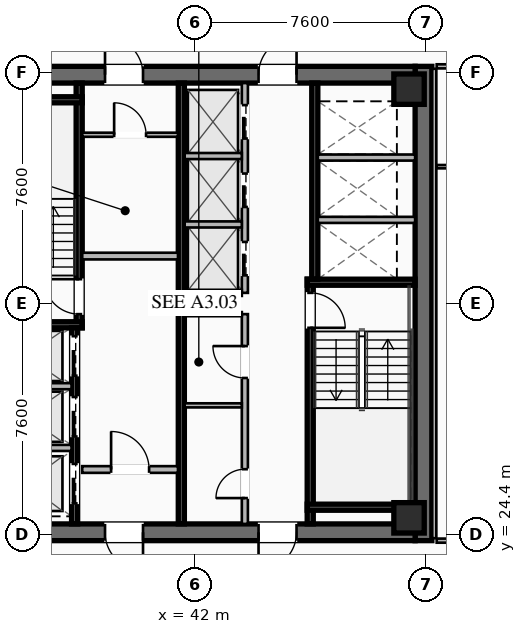
"""IFC4 building model, lengths in metres.
Left out: names, types, materials, properties, quantities, classifications, styles, units other than length and angle.
Written with IfcOpenShell. Run it as: python <this file> out.ifc"""

import sys

from ifc_helpers import new_model, si_unit, direction, frame, frame_2d, origin, origin_2d, place, context, subcontext, project, spatial, rectangle, hollow_rectangle, extrude, element, fill, save


model = new_model("IFC4")
c1 = context("Model", 3, precision=1e-05, world=origin(), true_north=direction((0.0, 1.0)))
c2 = subcontext(c1, "Body", "Model", "MODEL_VIEW")
j1 = project(units=[si_unit("LENGTHUNIT", "METRE"), si_unit("PLANEANGLEUNIT", "RADIAN")], contexts=[c1])
p1 = place(None, origin())
s1 = spatial("IfcSite", under=j1, at=p1, CompositionType="ELEMENT")
p2 = place(p1, origin())
s2 = spatial("IfcBuilding", under=s1, at=p2, CompositionType="ELEMENT")
p3 = place(p2, frame((0.0, 0.0, 164.1)))
s3 = spatial("IfcBuildingStorey", under=s2, at=p3, CompositionType="ELEMENT", Elevation=164.1)
p4 = place(p3, frame((49.525, 39.8, 0.0), z_axis=(0.0, 0.0, 1.0), x_axis=(0.0, -1.0, 0.0)))
e1 = element("IfcWall", 1, at=p4, inside=s3, PredefinedType="SHEAR", context=c2, shape_type="SweptSolid", body=[
    extrude(rectangle(XDim=15.6, YDim=0.55, at=frame_2d((7.8, 0.0))), origin(), (0.0, 0.0, 1.0), 3.55),
])
p5 = place(p3, frame((49.25, 24.475, 0.0), z_axis=(0.0, 0.0, 1.0), x_axis=(-1.0, 0.0, 0.0)))
e2 = element("IfcWall", 2, at=p5, inside=s3, PredefinedType="SHEAR", context=c2, shape_type="SweptSolid", body=[
    extrude(rectangle(XDim=14.5, YDim=0.55, at=frame_2d((7.25, 0.0))), origin(), (0.0, 0.0, 1.0), 3.55),
])
p6 = place(p5, frame((8.95, 0.0, 0.0)))
e3 = element("IfcOpeningElement", 3, at=p6, cuts=e2, PredefinedType="OPENING", context=c2, shape_type="SweptSolid", body=[
    extrude(rectangle(XDim=1.25, YDim=2.25, at=frame_2d((0.625, 1.125))), frame((0.0, 0.285, 0.0), z_axis=(0.0, -1.0, 0.0), x_axis=(1.0, 0.0, 0.0)), (0.0, 0.0, 1.0), 0.57),
])
p7 = place(p5, frame((3.9, 0.0, 0.0)))
e4 = element("IfcOpeningElement", 4, at=p7, cuts=e2, PredefinedType="OPENING", context=c2, shape_type="SweptSolid", body=[
    extrude(rectangle(XDim=1.25, YDim=2.25, at=frame_2d((0.625, 1.125))), frame((0.0, 0.285, 0.0), z_axis=(0.0, -1.0, 0.0), x_axis=(1.0, 0.0, 0.0)), (0.0, 0.0, 1.0), 0.57),
])
p8 = place(p3, frame((34.75, 39.525, 0.0), z_axis=(0.0, 0.0, 1.0), x_axis=(1.0, 0.0, 0.0)))
e5 = element("IfcWall", 5, at=p8, inside=s3, PredefinedType="SHEAR", context=c2, shape_type="SweptSolid", body=[
    extrude(rectangle(XDim=14.5, YDim=0.55, at=frame_2d((7.25, 0.0))), origin(), (0.0, 0.0, 1.0), 3.55),
])
p9 = place(p8, frame((4.3, 0.0, 0.0)))
e6 = element("IfcOpeningElement", 6, at=p9, cuts=e5, PredefinedType="OPENING", context=c2, shape_type="SweptSolid", body=[
    extrude(rectangle(XDim=1.25, YDim=2.25, at=frame_2d((0.625, 1.125))), frame((0.0, 0.285, 0.0), z_axis=(0.0, -1.0, 0.0), x_axis=(1.0, 0.0, 0.0)), (0.0, 0.0, 1.0), 0.57),
])
p10 = place(p8, frame((9.35, 0.0, 0.0)))
e7 = element("IfcOpeningElement", 7, at=p10, cuts=e5, PredefinedType="OPENING", context=c2, shape_type="SweptSolid", body=[
    extrude(rectangle(XDim=1.25, YDim=2.25, at=frame_2d((0.625, 1.125))), frame((0.0, 0.285, 0.0), z_axis=(0.0, -1.0, 0.0), x_axis=(1.0, 0.0, 0.0)), (0.0, 0.0, 1.0), 0.57),
])
for number, where, z_axis, x_axis in (
    (8, (49.05, 24.95, 0.0), (0.0, 0.0, 1.0), (1.0, 0.0, 0.0)),
    (9, (49.05, 39.05, 0.0), (0.0, 0.0, 1.0), (1.0, 0.0, 0.0)),
):
    element("IfcColumn", number, at=place(p3, frame(where, z_axis=z_axis, x_axis=x_axis)), inside=s3, PredefinedType="COLUMN", context=c2, shape_type="SweptSolid", body=[
        extrude(hollow_rectangle(XDim=1.0, YDim=1.0, WallThickness=0.04, at=origin_2d()), origin(), (0.0, 0.0, 1.0), 3.37),
    ])
p11 = place(p3, frame((38.2, 31.2, 0.0), z_axis=(0.0, 0.0, 1.0), x_axis=(0.0, 1.0, 0.0)))
e10 = element("IfcWall", 10, at=p11, inside=s3, PredefinedType="SHEAR", context=c2, shape_type="SweptSolid", body=[
    extrude(rectangle(XDim=8.05, YDim=0.2, at=frame_2d((4.025, 0.0))), origin(), (0.0, 0.0, 1.0), 3.37),
])
p12 = place(p11, frame((0.45, 0.0, 0.0)))
e11 = element("IfcOpeningElement", 11, at=p12, cuts=e10, PredefinedType="OPENING", context=c2, shape_type="SweptSolid", body=[
    extrude(rectangle(XDim=1.15, YDim=2.2, at=frame_2d((0.575, 1.1))), frame((0.0, 0.11, 0.0), z_axis=(0.0, -1.0, 0.0), x_axis=(1.0, 0.0, 0.0)), (0.0, 0.0, 1.0), 0.22),
])
for number, where, z_axis, x_axis in (
    (12, (34.75, 31.3, 0.0), (0.0, 0.0, 1.0), (1.0, 0.0, 0.0)),
    (13, (34.75, 38.7, 0.0), (0.0, 0.0, 1.0), (1.0, 0.0, 0.0)),
):
    element("IfcWall", number, at=place(p3, frame(where, z_axis=z_axis, x_axis=x_axis)), inside=s3, PredefinedType="SHEAR", context=c2, shape_type="SweptSolid", body=[
        extrude(rectangle(XDim=3.55, YDim=0.2, at=frame_2d((1.775, 0.0))), origin(), (0.0, 0.0, 1.0), 3.37),
    ])
p13 = place(p3, frame((45.8, 32.8, 0.0), z_axis=(0.0, 0.0, 1.0), x_axis=(0.0, -1.0, 0.0)))
e14 = element("IfcWall", 14, at=p13, inside=s3, PredefinedType="SHEAR", context=c2, shape_type="SweptSolid", body=[
    extrude(rectangle(XDim=8.05, YDim=0.2, at=frame_2d((4.025, 0.0))), origin(), (0.0, 0.0, 1.0), 3.37),
])
p14 = place(p13, frame((0.45, 0.0, 0.0)))
e15 = element("IfcOpeningElement", 15, at=p14, cuts=e14, PredefinedType="OPENING", context=c2, shape_type="SweptSolid", body=[
    extrude(rectangle(XDim=1.15, YDim=2.2, at=frame_2d((0.575, 1.1))), frame((0.0, 0.11, 0.0), z_axis=(0.0, -1.0, 0.0), x_axis=(1.0, 0.0, 0.0)), (0.0, 0.0, 1.0), 0.22),
])
for number, where, z_axis, x_axis in (
    (16, (45.7, 32.7, 0.0), (0.0, 0.0, 1.0), (1.0, 0.0, 0.0)),
    (17, (45.7, 25.3, 0.0), (0.0, 0.0, 1.0), (1.0, 0.0, 0.0)),
):
    element("IfcWall", number, at=place(p3, frame(where, z_axis=z_axis, x_axis=x_axis)), inside=s3, PredefinedType="SHEAR", context=c2, shape_type="SweptSolid", body=[
        extrude(rectangle(XDim=3.55, YDim=0.2, at=frame_2d((1.775, 0.0))), origin(), (0.0, 0.0, 1.0), 3.37),
    ])
p15 = place(p3, frame((41.56, 24.75, 0.0), z_axis=(0.0, 0.0, 1.0), x_axis=(0.0, 1.0, 0.0)))
e18 = element("IfcWall", 18, at=p15, inside=s3, PredefinedType="SHEAR", context=c2, shape_type="SweptSolid", body=[
    extrude(rectangle(XDim=14.5, YDim=0.2, at=frame_2d((7.25, 0.0))), origin(), (0.0, 0.0, 1.0), 3.37),
])
p16 = place(p3, frame((38.3, 33.56, 0.0), z_axis=(0.0, 0.0, 1.0), x_axis=(1.0, 0.0, 0.0)))
e19 = element("IfcWall", 19, at=p16, inside=s3, PredefinedType="SOLIDWALL", context=c2, shape_type="SweptSolid", body=[
    extrude(rectangle(XDim=3.15, YDim=0.22, at=frame_2d((1.575, 0.0))), origin(), (0.0, 0.0, 1.0), 2.723),
])
p17 = place(p3, frame((38.3, 26.54, 0.0), z_axis=(0.0, 0.0, 1.0), x_axis=(1.0, 0.0, 0.0)))
e20 = element("IfcWall", 20, at=p17, inside=s3, PredefinedType="SOLIDWALL", context=c2, shape_type="SweptSolid", body=[
    extrude(rectangle(XDim=3.15, YDim=0.22, at=frame_2d((1.575, 0.0))), origin(), (0.0, 0.0, 1.0), 2.723),
])
p18 = place(p17, frame((0.95, 0.0, 0.0)))
e21 = element("IfcOpeningElement", 21, at=p18, cuts=e20, PredefinedType="OPENING", context=c2, shape_type="SweptSolid", body=[
    extrude(rectangle(XDim=1.25, YDim=2.25, at=frame_2d((0.625, 1.125))), frame((0.0, 0.12, 0.0), z_axis=(0.0, -1.0, 0.0), x_axis=(1.0, 0.0, 0.0)), (0.0, 0.0, 1.0), 0.24),
])
p19 = place(p3, frame((38.05, 24.75, 0.0), z_axis=(0.0, 0.0, 1.0), x_axis=(0.0, 1.0, 0.0)))
e22 = element("IfcWall", 22, at=p19, inside=s3, PredefinedType="SHEAR", context=c2, shape_type="SweptSolid", body=[
    extrude(rectangle(XDim=6.45, YDim=0.2, at=frame_2d((3.225, 0.0))), origin(), (0.0, 0.0, 1.0), 3.37),
])
p20 = place(p19, frame((4.875, 0.0, 0.0)))
e23 = element("IfcOpeningElement", 23, at=p20, cuts=e22, PredefinedType="OPENING", context=c2, shape_type="SweptSolid", body=[
    extrude(rectangle(XDim=1.3, YDim=2.25, at=frame_2d((0.65, 1.125))), frame((0.0, 0.11, 0.0), z_axis=(0.0, -1.0, 0.0), x_axis=(1.0, 0.0, 0.0)), (0.0, 0.0, 1.0), 0.22),
])
p21 = place(p19, frame((2.875, 0.0, 0.0)))
e24 = element("IfcOpeningElement", 24, at=p21, cuts=e22, PredefinedType="OPENING", context=c2, shape_type="SweptSolid", body=[
    extrude(rectangle(XDim=1.3, YDim=2.25, at=frame_2d((0.65, 1.125))), frame((0.0, 0.11, 0.0), z_axis=(0.0, -1.0, 0.0), x_axis=(1.0, 0.0, 0.0)), (0.0, 0.0, 1.0), 0.22),
])
p22 = place(p19, frame((0.675, 0.0, 0.0)))
e25 = element("IfcOpeningElement", 25, at=p22, cuts=e22, PredefinedType="OPENING", context=c2, shape_type="SweptSolid", body=[
    extrude(rectangle(XDim=1.3, YDim=2.25, at=frame_2d((0.65, 1.125))), frame((0.0, 0.11, 0.0), z_axis=(0.0, -1.0, 0.0), x_axis=(1.0, 0.0, 0.0)), (0.0, 0.0, 1.0), 0.22),
])
for number, where, z_axis, x_axis in (
    (26, (34.75, 27.25, 0.0), (0.0, 0.0, 1.0), (1.0, 0.0, 0.0)),
    (27, (34.75, 29.28, 0.0), (0.0, 0.0, 1.0), (1.0, 0.0, 0.0)),
):
    element("IfcWall", number, at=place(p3, frame(where, z_axis=z_axis, x_axis=x_axis)), inside=s3, PredefinedType="SOLIDWALL", context=c2, shape_type="SweptSolid", body=[
        extrude(rectangle(XDim=3.2, YDim=0.2, at=frame_2d((1.6, 0.0))), origin(), (0.0, 0.0, 1.0), 3.37),
    ])
p23 = place(p3, frame((45.95, 39.25, 0.0), z_axis=(0.0, 0.0, 1.0), x_axis=(0.0, -1.0, 0.0)))
e28 = element("IfcWall", 28, at=p23, inside=s3, PredefinedType="SHEAR", context=c2, shape_type="SweptSolid", body=[
    extrude(rectangle(XDim=6.45, YDim=0.2, at=frame_2d((3.225, 0.0))), origin(), (0.0, 0.0, 1.0), 3.37),
])
for number, where, z_axis, x_axis in (
    (29, (46.05, 34.75, 0.0), (0.0, 0.0, 1.0), (1.0, 0.0, 0.0)),
    (30, (46.05, 36.8, 0.0), (0.0, 0.0, 1.0), (1.0, 0.0, 0.0)),
):
    element("IfcWall", number, at=place(p3, frame(where, z_axis=z_axis, x_axis=x_axis)), inside=s3, PredefinedType="SOLIDWALL", context=c2, shape_type="SweptSolid", body=[
        extrude(rectangle(XDim=3.2, YDim=0.2, at=frame_2d((1.6, 0.0))), origin(), (0.0, 0.0, 1.0), 3.37),
    ])
p24 = place(p3, frame((38.3, 37.55, 0.0), z_axis=(0.0, 0.0, 1.0), x_axis=(1.0, 0.0, 0.0)))
e31 = element("IfcWall", 31, at=p24, inside=s3, PredefinedType="PARTITIONING", context=c2, shape_type="SweptSolid", body=[
    extrude(rectangle(XDim=3.15, YDim=0.135, at=frame_2d((1.575, 0.0))), origin(), (0.0, 0.0, 1.0), 2.723),
])
p25 = place(p24, frame((1.05, 0.0, 0.0)))
e32 = element("IfcOpeningElement", 32, at=p25, cuts=e31, PredefinedType="OPENING", context=c2, shape_type="SweptSolid", body=[
    extrude(rectangle(XDim=1.05, YDim=2.2, at=frame_2d((0.525, 1.1))), frame((0.0, 0.077, 0.0), z_axis=(0.0, -1.0, 0.0), x_axis=(1.0, 0.0, 0.0)), (0.0, 0.0, 1.0), 0.155),
])
p26 = place(p3, frame((43.65, 24.75, 0.0), z_axis=(0.0, 0.0, 1.0), x_axis=(0.0, 1.0, 0.0)))
e33 = element("IfcWall", 33, at=p26, inside=s3, PredefinedType="SOLIDWALL", context=c2, shape_type="SweptSolid", body=[
    extrude(rectangle(XDim=6.9, YDim=0.2, at=frame_2d((3.45, 0.0))), origin(), (0.0, 0.0, 1.0), 2.723),
])
p27 = place(p26, frame((0.85, 0.0, 0.0)))
e34 = element("IfcOpeningElement", 34, at=p27, cuts=e33, PredefinedType="OPENING", context=c2, shape_type="SweptSolid", body=[
    extrude(rectangle(XDim=0.95, YDim=2.05, at=frame_2d((0.475, 1.025))), frame((0.0, 0.11, 0.0), z_axis=(0.0, -1.0, 0.0), x_axis=(1.0, 0.0, 0.0)), (0.0, 0.0, 1.0), 0.22),
])
p28 = place(p26, frame((4.8, 0.0, 0.0)))
e35 = element("IfcOpeningElement", 35, at=p28, cuts=e33, PredefinedType="OPENING", context=c2, shape_type="SweptSolid", body=[
    extrude(rectangle(XDim=1.05, YDim=2.2, at=frame_2d((0.525, 1.1))), frame((0.0, 0.11, 0.0), z_axis=(0.0, -1.0, 0.0), x_axis=(1.0, 0.0, 0.0)), (0.0, 0.0, 1.0), 0.22),
])
for number, where, z_axis, x_axis in (
    (36, (41.67, 31.65, 0.0), (0.0, 0.0, 1.0), (1.0, 0.0, 0.0)),
    (37, (41.67, 28.65, 0.0), (0.0, 0.0, 1.0), (1.0, 0.0, 0.0)),
):
    element("IfcWall", number, at=place(p3, frame(where, z_axis=z_axis, x_axis=x_axis)), inside=s3, PredefinedType="PARTITIONING", context=c2, shape_type="SweptSolid", body=[
        extrude(rectangle(XDim=1.88, YDim=0.135, at=frame_2d((0.94, 0.0))), origin(), (0.0, 0.0, 1.0), 2.723),
    ])
p29 = place(p3, frame((43.65, 32.35, 0.0), z_axis=(0.0, 0.0, 1.0), x_axis=(0.0, 1.0, 0.0)))
e38 = element("IfcWall", 38, at=p29, inside=s3, PredefinedType="SOLIDWALL", context=c2, shape_type="SweptSolid", body=[
    extrude(rectangle(XDim=6.9, YDim=0.2, at=frame_2d((3.45, 0.0))), origin(), (0.0, 0.0, 1.0), 3.37),
])
p30 = place(p29, frame((0.575, 0.0, 0.0)))
e39 = element("IfcOpeningElement", 39, at=p30, cuts=e38, PredefinedType="OPENING", context=c2, shape_type="SweptSolid", body=[
    extrude(rectangle(XDim=1.1, YDim=2.2, at=frame_2d((0.55, 1.1))), frame((0.0, 0.11, 0.0), z_axis=(0.0, -1.0, 0.0), x_axis=(1.0, 0.0, 0.0)), (0.0, 0.0, 1.0), 0.22),
])
p31 = place(p29, frame((2.825, 0.0, 0.0)))
e40 = element("IfcOpeningElement", 40, at=p31, cuts=e38, PredefinedType="OPENING", context=c2, shape_type="SweptSolid", body=[
    extrude(rectangle(XDim=1.1, YDim=2.2, at=frame_2d((0.55, 1.1))), frame((0.0, 0.11, 0.0), z_axis=(0.0, -1.0, 0.0), x_axis=(1.0, 0.0, 0.0)), (0.0, 0.0, 1.0), 0.22),
])
p32 = place(p29, frame((5.075, 0.0, 0.0)))
e41 = element("IfcOpeningElement", 41, at=p32, cuts=e38, PredefinedType="OPENING", context=c2, shape_type="SweptSolid", body=[
    extrude(rectangle(XDim=1.1, YDim=2.2, at=frame_2d((0.55, 1.1))), frame((0.0, 0.11, 0.0), z_axis=(0.0, -1.0, 0.0), x_axis=(1.0, 0.0, 0.0)), (0.0, 0.0, 1.0), 0.22),
])
for number, where, z_axis, x_axis in (
    (42, (41.67, 32.35, 0.0), (0.0, 0.0, 1.0), (1.0, 0.0, 0.0)),
    (43, (41.67, 34.6, 0.0), (0.0, 0.0, 1.0), (1.0, 0.0, 0.0)),
    (44, (41.67, 36.85, 0.0), (0.0, 0.0, 1.0), (1.0, 0.0, 0.0)),
):
    element("IfcWall", number, at=place(p3, frame(where, z_axis=z_axis, x_axis=x_axis)), inside=s3, PredefinedType="SOLIDWALL", context=c2, shape_type="SweptSolid", body=[
        extrude(rectangle(XDim=1.88, YDim=0.2, at=frame_2d((0.94, 0.0))), origin(), (0.0, 0.0, 1.0), 3.37),
    ])
p33 = place(p3, frame((49.88, 39.72, 0.0), z_axis=(0.0, 0.0, 1.0), x_axis=(0.0, -1.0, 0.0)))
e45 = element("IfcWall", 45, at=p33, inside=s3, PredefinedType="PARTITIONING", context=c2, shape_type="SweptSolid", body=[
    extrude(rectangle(XDim=15.44, YDim=0.135, at=frame_2d((7.72, 0.0))), origin(), (0.0, 0.0, 1.0), 2.723),
])
p34 = place(p3, frame((59.68, 39.8, 0.0), z_axis=(0.0, 0.0, 1.0), x_axis=(-1.0, 0.0, 0.0)))
e46 = element("IfcWall", 46, at=p34, inside=s3, PredefinedType="PARTITIONING", context=c2, shape_type="SweptSolid", body=[
    extrude(rectangle(XDim=9.72, YDim=0.135, at=frame_2d((4.86, 0.0))), origin(), (0.0, 0.0, 1.0), 2.723),
])
p35 = place(p34, frame((8.28, 0.0, 0.0)))
e47 = element("IfcOpeningElement", 47, at=p35, cuts=e46, PredefinedType="OPENING", context=c2, shape_type="SweptSolid", body=[
    extrude(rectangle(XDim=0.95, YDim=2.05, at=frame_2d((0.475, 1.025))), frame((0.0, 0.077, 0.0), z_axis=(0.0, -1.0, 0.0), x_axis=(1.0, 0.0, 0.0)), (0.0, 0.0, 1.0), 0.155),
])
p36 = place(p3, frame((49.96, 24.2, 0.0), z_axis=(0.0, 0.0, 1.0), x_axis=(1.0, 0.0, 0.0)))
e48 = element("IfcWall", 48, at=p36, inside=s3, PredefinedType="PARTITIONING", context=c2, shape_type="SweptSolid", body=[
    extrude(rectangle(XDim=9.72, YDim=0.135, at=frame_2d((4.86, 0.0))), origin(), (0.0, 0.0, 1.0), 2.723),
])
p37 = place(p36, frame((0.5, 0.0, 0.0)))
e49 = element("IfcOpeningElement", 49, at=p37, cuts=e48, PredefinedType="OPENING", context=c2, shape_type="SweptSolid", body=[
    extrude(rectangle(XDim=0.95, YDim=2.05, at=frame_2d((0.475, 1.025))), frame((0.0, 0.077, 0.0), z_axis=(0.0, -1.0, 0.0), x_axis=(1.0, 0.0, 0.0)), (0.0, 0.0, 1.0), 0.155),
])
p38 = place(p3, frame((49.96, 36.5, 0.0), z_axis=(0.0, 0.0, 1.0), x_axis=(1.0, 0.0, 0.0)))
e50 = element("IfcWall", 50, at=p38, inside=s3, PredefinedType="PARTITIONING", context=c2, shape_type="SweptSolid", body=[
    extrude(rectangle(XDim=9.72, YDim=0.11, at=frame_2d((4.86, 0.0))), origin(), (0.0, 0.0, 1.0), 2.723),
])
p39 = place(p9, origin())
e51 = element("IfcDoor", 51, at=p39, inside=s3, OperationType="SINGLE_SWING_LEFT", PredefinedType="DOOR", context=c2, shape_type="SweptSolid", body=[
    extrude(rectangle(XDim=1.25, YDim=2.25, at=frame_2d((0.625, 1.125))), frame((0.0, 0.025, 0.0), z_axis=(0.0, -1.0, 0.0), x_axis=(1.0, 0.0, 0.0)), (0.0, 0.0, 1.0), 0.05),
])
fill(e6, e51)
p40 = place(p10, origin())
e52 = element("IfcDoor", 52, at=p40, inside=s3, OperationType="SINGLE_SWING_RIGHT", PredefinedType="DOOR", context=c2, shape_type="SweptSolid", body=[
    extrude(rectangle(XDim=1.25, YDim=2.25, at=frame_2d((0.625, 1.125))), frame((0.0, 0.025, 0.0), z_axis=(0.0, -1.0, 0.0), x_axis=(1.0, 0.0, 0.0)), (0.0, 0.0, 1.0), 0.05),
])
fill(e7, e52)
p41 = place(p6, origin())
e53 = element("IfcDoor", 53, at=p41, inside=s3, OperationType="SINGLE_SWING_LEFT", PredefinedType="DOOR", context=c2, shape_type="SweptSolid", body=[
    extrude(rectangle(XDim=1.25, YDim=2.25, at=frame_2d((0.625, 1.125))), frame((0.0, 0.025, 0.0), z_axis=(0.0, -1.0, 0.0), x_axis=(1.0, 0.0, 0.0)), (0.0, 0.0, 1.0), 0.05),
])
fill(e3, e53)
p42 = place(p7, origin())
e54 = element("IfcDoor", 54, at=p42, inside=s3, OperationType="SINGLE_SWING_RIGHT", PredefinedType="DOOR", context=c2, shape_type="SweptSolid", body=[
    extrude(rectangle(XDim=1.25, YDim=2.25, at=frame_2d((0.625, 1.125))), frame((0.0, 0.025, 0.0), z_axis=(0.0, -1.0, 0.0), x_axis=(1.0, 0.0, 0.0)), (0.0, 0.0, 1.0), 0.05),
])
fill(e4, e54)
p43 = place(p12, origin())
e55 = element("IfcDoor", 55, at=p43, inside=s3, OperationType="SINGLE_SWING_RIGHT", PredefinedType="DOOR", context=c2, shape_type="SweptSolid", body=[
    extrude(rectangle(XDim=1.15, YDim=2.2, at=frame_2d((0.575, 1.1))), frame((0.0, 0.025, 0.0), z_axis=(0.0, -1.0, 0.0), x_axis=(1.0, 0.0, 0.0)), (0.0, 0.0, 1.0), 0.05),
])
fill(e11, e55)
p44 = place(p14, origin())
e56 = element("IfcDoor", 56, at=p44, inside=s3, OperationType="SINGLE_SWING_RIGHT", PredefinedType="DOOR", context=c2, shape_type="SweptSolid", body=[
    extrude(rectangle(XDim=1.15, YDim=2.2, at=frame_2d((0.575, 1.1))), frame((0.0, 0.025, 0.0), z_axis=(0.0, -1.0, 0.0), x_axis=(1.0, 0.0, 0.0)), (0.0, 0.0, 1.0), 0.05),
])
fill(e15, e56)
p45 = place(p18, origin())
e57 = element("IfcDoor", 57, at=p45, inside=s3, OperationType="SINGLE_SWING_LEFT", PredefinedType="DOOR", context=c2, shape_type="SweptSolid", body=[
    extrude(rectangle(XDim=1.25, YDim=2.25, at=frame_2d((0.625, 1.125))), frame((0.0, 0.025, 0.0), z_axis=(0.0, -1.0, 0.0), x_axis=(1.0, 0.0, 0.0)), (0.0, 0.0, 1.0), 0.05),
])
fill(e21, e57)
p46 = place(p25, origin())
e58 = element("IfcDoor", 58, at=p46, inside=s3, OperationType="SINGLE_SWING_LEFT", PredefinedType="DOOR", context=c2, shape_type="SweptSolid", body=[
    extrude(rectangle(XDim=1.05, YDim=2.2, at=frame_2d((0.525, 1.1))), frame((0.0, 0.025, 0.0), z_axis=(0.0, -1.0, 0.0), x_axis=(1.0, 0.0, 0.0)), (0.0, 0.0, 1.0), 0.05),
])
fill(e32, e58)
p47 = place(p27, origin())
e59 = element("IfcDoor", 59, at=p47, inside=s3, OperationType="SINGLE_SWING_LEFT", PredefinedType="DOOR", context=c2, shape_type="SweptSolid", body=[
    extrude(rectangle(XDim=0.95, YDim=2.05, at=frame_2d((0.475, 1.025))), frame((0.0, 0.025, 0.0), z_axis=(0.0, -1.0, 0.0), x_axis=(1.0, 0.0, 0.0)), (0.0, 0.0, 1.0), 0.05),
])
fill(e34, e59)
p48 = place(p28, origin())
e60 = element("IfcDoor", 60, at=p48, inside=s3, OperationType="SINGLE_SWING_RIGHT", PredefinedType="DOOR", context=c2, shape_type="SweptSolid", body=[
    extrude(rectangle(XDim=1.05, YDim=2.2, at=frame_2d((0.525, 1.1))), frame((0.0, 0.025, 0.0), z_axis=(0.0, -1.0, 0.0), x_axis=(1.0, 0.0, 0.0)), (0.0, 0.0, 1.0), 0.05),
])
fill(e35, e60)
p49 = place(p20, origin())
e61 = element("IfcDoor", 61, at=p49, inside=s3, OperationType="SLIDING_TO_LEFT", PredefinedType="DOOR", context=c2, shape_type="SweptSolid", body=[
    extrude(rectangle(XDim=1.3, YDim=2.25, at=frame_2d((0.65, 1.125))), frame((0.0, 0.025, 0.0), z_axis=(0.0, -1.0, 0.0), x_axis=(1.0, 0.0, 0.0)), (0.0, 0.0, 1.0), 0.05),
])
fill(e23, e61)
p50 = place(p21, origin())
e62 = element("IfcDoor", 62, at=p50, inside=s3, OperationType="SLIDING_TO_LEFT", PredefinedType="DOOR", context=c2, shape_type="SweptSolid", body=[
    extrude(rectangle(XDim=1.3, YDim=2.25, at=frame_2d((0.65, 1.125))), frame((0.0, 0.025, 0.0), z_axis=(0.0, -1.0, 0.0), x_axis=(1.0, 0.0, 0.0)), (0.0, 0.0, 1.0), 0.05),
])
fill(e24, e62)
p51 = place(p22, origin())
e63 = element("IfcDoor", 63, at=p51, inside=s3, OperationType="SLIDING_TO_LEFT", PredefinedType="DOOR", context=c2, shape_type="SweptSolid", body=[
    extrude(rectangle(XDim=1.3, YDim=2.25, at=frame_2d((0.65, 1.125))), frame((0.0, 0.025, 0.0), z_axis=(0.0, -1.0, 0.0), x_axis=(1.0, 0.0, 0.0)), (0.0, 0.0, 1.0), 0.05),
])
fill(e25, e63)
p52 = place(p30, origin())
e64 = element("IfcDoor", 64, at=p52, inside=s3, OperationType="SLIDING_TO_LEFT", PredefinedType="DOOR", context=c2, shape_type="SweptSolid", body=[
    extrude(rectangle(XDim=1.1, YDim=2.2, at=frame_2d((0.55, 1.1))), frame((0.0, 0.025, 0.0), z_axis=(0.0, -1.0, 0.0), x_axis=(1.0, 0.0, 0.0)), (0.0, 0.0, 1.0), 0.05),
])
fill(e39, e64)
p53 = place(p31, origin())
e65 = element("IfcDoor", 65, at=p53, inside=s3, OperationType="SLIDING_TO_LEFT", PredefinedType="DOOR", context=c2, shape_type="SweptSolid", body=[
    extrude(rectangle(XDim=1.1, YDim=2.2, at=frame_2d((0.55, 1.1))), frame((0.0, 0.025, 0.0), z_axis=(0.0, -1.0, 0.0), x_axis=(1.0, 0.0, 0.0)), (0.0, 0.0, 1.0), 0.05),
])
fill(e40, e65)
p54 = place(p32, origin())
e66 = element("IfcDoor", 66, at=p54, inside=s3, OperationType="SLIDING_TO_LEFT", PredefinedType="DOOR", context=c2, shape_type="SweptSolid", body=[
    extrude(rectangle(XDim=1.1, YDim=2.2, at=frame_2d((0.55, 1.1))), frame((0.0, 0.025, 0.0), z_axis=(0.0, -1.0, 0.0), x_axis=(1.0, 0.0, 0.0)), (0.0, 0.0, 1.0), 0.05),
])
fill(e41, e66)
save(model, sys.argv[1])
